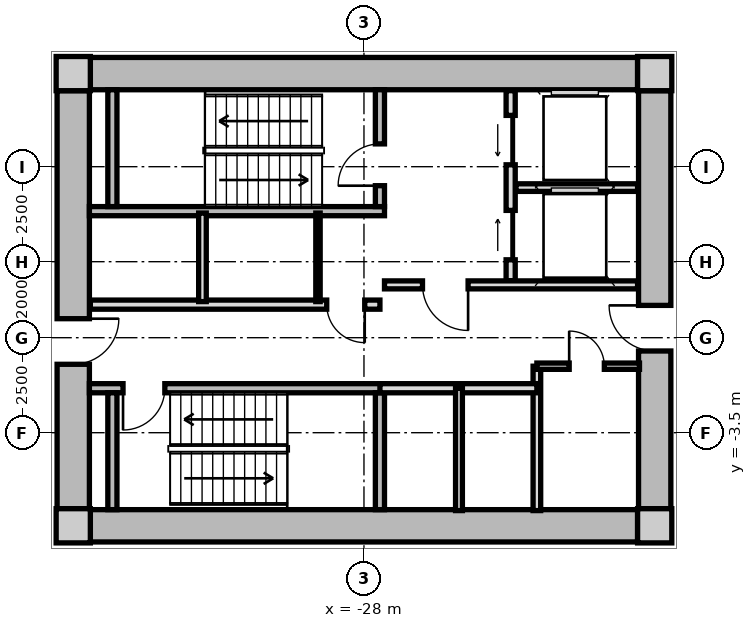
"""IFC4 building model, lengths in metres.
Left out: names, types, materials, properties, quantities, classifications, styles, units other than length and angle.
Written with IfcOpenShell. Run it as: python <this file> out.ifc"""

import sys

from ifc_helpers import new_model, si_unit, direction, frame, frame_2d, origin, origin_2d, place, context, subcontext, project, spatial, rectangle, extrude, source, transform, mapped, element, fill, save


model = new_model("IFC4")
c1 = context("Model", 3, precision=1e-05, world=origin(), true_north=direction((0.0, 1.0)))
c2 = subcontext(c1, "Body", "Model", "MODEL_VIEW")
j1 = project(units=[si_unit("LENGTHUNIT", "METRE"), si_unit("PLANEANGLEUNIT", "RADIAN")], contexts=[c1])
p1 = place(None, origin())
s1 = spatial("IfcSite", under=j1, at=p1, CompositionType="ELEMENT")
p2 = place(p1, origin())
s2 = spatial("IfcBuilding", under=s1, at=p2, CompositionType="ELEMENT")
p3 = place(p2, frame((0.0, 0.0, -8.4)))
s3 = spatial("IfcBuildingStorey", under=s2, at=p3, CompositionType="ELEMENT", Elevation=-8.4)
m1 = source(origin(), c2, "Body", "SweptSolid", [
    extrude(rectangle(XDim=0.9, YDim=0.9, at=origin_2d()), origin(), (0.0, 0.0, 1.0), 4.2),
])
for number, where, z_axis, x_axis in (
    (1, (-35.65, -5.95, 0.0), (0.0, 0.0, 1.0), (1.0, 0.0, 0.0)),
    (2, (-20.35, -5.95, 0.0), (0.0, 0.0, 1.0), (1.0, 0.0, 0.0)),
    (3, (-20.35, 5.95, 0.0), (0.0, 0.0, 1.0), (1.0, 0.0, 0.0)),
    (4, (-35.65, 5.95, 0.0), (0.0, 0.0, 1.0), (1.0, 0.0, 0.0)),
):
    element("IfcColumn", number, at=place(p3, frame(where, z_axis=z_axis, x_axis=x_axis)), inside=s3, PredefinedType="COLUMN", context=c2, shape_type="MappedRepresentation", body=[
        mapped(m1, transform((0.0, 0.0, 0.0), x_axis=(1.0, 0.0, 0.0), y_axis=(0.0, 1.0, 0.0), z_axis=(0.0, 0.0, 1.0), scale=1.0)),
    ])
m2 = source(origin(), c2, "Body", "SweptSolid", [
    extrude(rectangle(XDim=14.4, YDim=0.85, at=frame_2d((7.2, 0.0))), origin(), (0.0, 0.0, 1.0), 3.88),
])
for number, where, z_axis, x_axis in (
    (5, (-35.2, 5.95, 0.0), (0.0, 0.0, 1.0), (1.0, 0.0, 0.0)),
    (6, (-20.8, -5.95, 0.0), (0.0, 0.0, 1.0), (-1.0, 0.0, 0.0)),
):
    element("IfcWall", number, at=place(p3, frame(where, z_axis=z_axis, x_axis=x_axis)), inside=s3, PredefinedType="SHEAR", context=c2, shape_type="MappedRepresentation", body=[
        mapped(m2, transform((0.0, 0.0, 0.0), x_axis=(1.0, 0.0, 0.0), y_axis=(0.0, 1.0, 0.0), z_axis=(0.0, 0.0, 1.0), scale=1.0)),
    ])
m3 = source(origin(), c2, "Body", "SweptSolid", [
    extrude(rectangle(XDim=11.0, YDim=0.85, at=frame_2d((5.5, 0.0))), origin(), (0.0, 0.0, 1.0), 3.88),
])
p4 = place(p3, frame((-35.65, -5.5, 0.0), z_axis=(0.0, 0.0, 1.0), x_axis=(0.0, 1.0, 0.0)))
e7 = element("IfcWall", 7, at=p4, inside=s3, PredefinedType="SHEAR", context=c2, shape_type="MappedRepresentation", body=[
    mapped(m3, transform((0.0, 0.0, 0.0), x_axis=(1.0, 0.0, 0.0), y_axis=(0.0, 1.0, 0.0), z_axis=(0.0, 0.0, 1.0), scale=1.0)),
])
p5 = place(p4, frame((3.8, 0.0, 0.0)))
e8 = element("IfcOpeningElement", 8, at=p5, cuts=e7, PredefinedType="OPENING", context=c2, shape_type="SweptSolid", body=[
    extrude(rectangle(XDim=1.2, YDim=2.15, at=frame_2d((0.6, 1.075))), frame((0.0, 0.435, 0.0), z_axis=(0.0, -1.0, 0.0), x_axis=(1.0, 0.0, 0.0)), (0.0, 0.0, 1.0), 0.87),
])
p6 = place(p3, frame((-20.35, 5.5, 0.0), z_axis=(0.0, 0.0, 1.0), x_axis=(0.0, -1.0, 0.0)))
e9 = element("IfcWall", 9, at=p6, inside=s3, PredefinedType="SHEAR", context=c2, shape_type="MappedRepresentation", body=[
    mapped(m3, transform((0.0, 0.0, 0.0), x_axis=(1.0, 0.0, 0.0), y_axis=(0.0, 1.0, 0.0), z_axis=(0.0, 0.0, 1.0), scale=1.0)),
])
p7 = place(p6, frame((5.65, 0.0, 0.0)))
e10 = element("IfcOpeningElement", 10, at=p7, cuts=e9, PredefinedType="OPENING", context=c2, shape_type="SweptSolid", body=[
    extrude(rectangle(XDim=1.2, YDim=2.15, at=frame_2d((0.6, 1.075))), frame((0.0, 0.435, 0.0), z_axis=(0.0, -1.0, 0.0), x_axis=(1.0, 0.0, 0.0)), (0.0, 0.0, 1.0), 0.87),
])
m4 = source(origin(), c2, "Body", "SweptSolid", [
    extrude(rectangle(XDim=7.765, YDim=0.24, at=frame_2d((3.883, 0.0))), origin(), (0.0, 0.0, 1.0), 3.88),
])
p8 = place(p3, frame((-35.225, 2.33, 0.0), z_axis=(0.0, 0.0, 1.0), x_axis=(1.0, 0.0, 0.0)))
e11 = element("IfcWall", 11, at=p8, inside=s3, PredefinedType="PARTITIONING", context=c2, shape_type="MappedRepresentation", body=[
    mapped(m4, transform((0.0, 0.0, 0.0), x_axis=(1.0, 0.0, 0.0), y_axis=(0.0, 1.0, 0.0), z_axis=(0.0, 0.0, 1.0), scale=1.0)),
])
m5 = source(origin(), c2, "Body", "SweptSolid", [
    extrude(rectangle(XDim=3.075, YDim=0.24, at=frame_2d((1.538, 0.0))), origin(), (0.0, 0.0, 1.0), 3.88),
])
p9 = place(p3, frame((-34.62, 2.45, 0.0), z_axis=(0.0, 0.0, 1.0), x_axis=(0.0, 1.0, 0.0)))
e12 = element("IfcWall", 12, at=p9, inside=s3, PredefinedType="PARTITIONING", context=c2, shape_type="MappedRepresentation", body=[
    mapped(m5, transform((0.0, 0.0, 0.0), x_axis=(1.0, 0.0, 0.0), y_axis=(0.0, 1.0, 0.0), z_axis=(0.0, 0.0, 1.0), scale=1.0)),
])
p10 = place(p3, frame((-27.58, 2.45, 0.0), z_axis=(0.0, 0.0, 1.0), x_axis=(0.0, 1.0, 0.0)))
e13 = element("IfcWall", 13, at=p10, inside=s3, PredefinedType="PARTITIONING", context=c2, shape_type="MappedRepresentation", body=[
    mapped(m5, transform((0.0, 0.0, 0.0), x_axis=(1.0, 0.0, 0.0), y_axis=(0.0, 1.0, 0.0), z_axis=(0.0, 0.0, 1.0), scale=1.0)),
])
p11 = place(p10, frame((0.55, 0.0, 0.0)))
e14 = element("IfcOpeningElement", 14, at=p11, cuts=e13, PredefinedType="OPENING", context=c2, shape_type="SweptSolid", body=[
    extrude(rectangle(XDim=1.1, YDim=2.15, at=frame_2d((0.55, 1.075))), frame((0.0, 0.13, 0.0), z_axis=(0.0, -1.0, 0.0), x_axis=(1.0, 0.0, 0.0)), (0.0, 0.0, 1.0), 0.26),
])
p12 = place(p3, frame((-35.225, -2.33, 0.0), z_axis=(0.0, 0.0, 1.0), x_axis=(1.0, 0.0, 0.0)))
e15 = element("IfcWall", 15, at=p12, inside=s3, PredefinedType="PARTITIONING", context=c2, shape_type="MappedRepresentation", body=[
    mapped(m4, transform((0.0, 0.0, 0.0), x_axis=(1.0, 0.0, 0.0), y_axis=(0.0, 1.0, 0.0), z_axis=(0.0, 0.0, 1.0), scale=1.0)),
])
p13 = place(p12, frame((0.885, 0.0, 0.0)))
e16 = element("IfcOpeningElement", 16, at=p13, cuts=e15, PredefinedType="OPENING", context=c2, shape_type="SweptSolid", body=[
    extrude(rectangle(XDim=1.1, YDim=2.15, at=frame_2d((0.55, 1.075))), frame((0.0, 0.13, 0.0), z_axis=(0.0, -1.0, 0.0), x_axis=(1.0, 0.0, 0.0)), (0.0, 0.0, 1.0), 0.26),
])
for number, where, z_axis, x_axis in (
    (17, (-34.62, -5.525, 0.0), (0.0, 0.0, 1.0), (0.0, 1.0, 0.0)),
    (18, (-27.58, -5.525, 0.0), (0.0, 0.0, 1.0), (0.0, 1.0, 0.0)),
):
    element("IfcWall", number, at=place(p3, frame(where, z_axis=z_axis, x_axis=x_axis)), inside=s3, PredefinedType="PARTITIONING", context=c2, shape_type="MappedRepresentation", body=[
        mapped(m5, transform((0.0, 0.0, 0.0), x_axis=(1.0, 0.0, 0.0), y_axis=(0.0, 1.0, 0.0), z_axis=(0.0, 0.0, 1.0), scale=1.0)),
    ])
m6 = source(origin(), c2, "Body", "SweptSolid", [
    extrude(rectangle(XDim=5.0, YDim=0.24, at=frame_2d((2.5, 0.0))), origin(), (0.0, 0.0, 1.0), 3.865),
])
p14 = place(p3, frame((-24.14, 0.5, 0.0), z_axis=(0.0, 0.0, 1.0), x_axis=(0.0, 1.0, 0.0)))
e19 = element("IfcWall", 19, at=p14, inside=s3, PredefinedType="PARTITIONING", context=c2, shape_type="MappedRepresentation", body=[
    mapped(m6, transform((0.0, 0.0, 0.0), x_axis=(1.0, 0.0, 0.0), y_axis=(0.0, 1.0, 0.0), z_axis=(0.0, 0.0, 1.0), scale=1.0)),
])
p15 = place(p14, frame((3.05, 0.0, 0.0)))
e20 = element("IfcOpeningElement", 20, at=p15, cuts=e19, PredefinedType="OPENING", context=c2, shape_type="SweptSolid", body=[
    extrude(rectangle(XDim=1.3, YDim=2.2, at=frame_2d((0.65, 1.1))), frame((0.0, 0.13, 0.0), z_axis=(0.0, -1.0, 0.0), x_axis=(1.0, 0.0, 0.0)), (0.0, 0.0, 1.0), 0.26),
])
p16 = place(p14, frame((0.55, 0.0, 0.0)))
e21 = element("IfcOpeningElement", 21, at=p16, cuts=e19, PredefinedType="OPENING", context=c2, shape_type="SweptSolid", body=[
    extrude(rectangle(XDim=1.3, YDim=2.2, at=frame_2d((0.65, 1.1))), frame((0.0, 0.13, 0.0), z_axis=(0.0, -1.0, 0.0), x_axis=(1.0, 0.0, 0.0)), (0.0, 0.0, 1.0), 0.26),
])
m7 = source(origin(), c2, "Body", "SweptSolid", [
    extrude(rectangle(XDim=3.2, YDim=0.2, at=frame_2d((1.6, 0.0))), origin(), (0.0, 0.0, 1.0), 3.865),
])
p17 = place(p3, frame((-24.0, 2.95, 0.0), z_axis=(0.0, 0.0, 1.0), x_axis=(1.0, 0.0, 0.0)))
e22 = element("IfcWall", 22, at=p17, inside=s3, PredefinedType="PARTITIONING", context=c2, shape_type="MappedRepresentation", body=[
    mapped(m7, transform((0.0, 0.0, 0.0), x_axis=(1.0, 0.0, 0.0), y_axis=(0.0, 1.0, 0.0), z_axis=(0.0, 0.0, 1.0), scale=1.0)),
])
m8 = source(origin(), c2, "Body", "SweptSolid", [
    extrude(rectangle(XDim=6.66, YDim=0.21, at=frame_2d((3.33, 0.0))), origin(), (0.0, 0.0, 1.0), 3.865),
])
p18 = place(p3, frame((-27.46, 0.39, 0.0), z_axis=(0.0, 0.0, 1.0), x_axis=(1.0, 0.0, 0.0)))
e23 = element("IfcWall", 23, at=p18, inside=s3, PredefinedType="PARTITIONING", context=c2, shape_type="MappedRepresentation", body=[
    mapped(m8, transform((0.0, 0.0, 0.0), x_axis=(1.0, 0.0, 0.0), y_axis=(0.0, 1.0, 0.0), z_axis=(0.0, 0.0, 1.0), scale=1.0)),
])
p19 = place(p18, frame((1.0, 0.0, 0.0)))
e24 = element("IfcOpeningElement", 24, at=p19, cuts=e23, PredefinedType="OPENING", context=c2, shape_type="SweptSolid", body=[
    extrude(rectangle(XDim=1.2, YDim=2.15, at=frame_2d((0.6, 1.075))), frame((0.0, 0.115, 0.0), z_axis=(0.0, -1.0, 0.0), x_axis=(1.0, 0.0, 0.0)), (0.0, 0.0, 1.0), 0.23),
])
m9 = source(origin(), c2, "Body", "SweptSolid", [
    extrude(rectangle(XDim=7.62, YDim=0.24, at=frame_2d((3.81, 0.0))), origin(), (0.0, 0.0, 1.0), 3.865),
])
p20 = place(p3, frame((-35.2, -0.13, 0.0), z_axis=(0.0, 0.0, 1.0), x_axis=(1.0, 0.0, 0.0)))
e25 = element("IfcWall", 25, at=p20, inside=s3, PredefinedType="PARTITIONING", context=c2, shape_type="MappedRepresentation", body=[
    mapped(m9, transform((0.0, 0.0, 0.0), x_axis=(1.0, 0.0, 0.0), y_axis=(0.0, 1.0, 0.0), z_axis=(0.0, 0.0, 1.0), scale=1.0)),
])
p21 = place(p20, frame((6.22, 0.0, 0.0)))
e26 = element("IfcOpeningElement", 26, at=p21, cuts=e25, PredefinedType="OPENING", context=c2, shape_type="SweptSolid", body=[
    extrude(rectangle(XDim=1.0, YDim=2.1, at=frame_2d((0.5, 1.05))), frame((0.0, 0.13, 0.0), z_axis=(0.0, -1.0, 0.0), x_axis=(1.0, 0.0, 0.0)), (0.0, 0.0, 1.0), 0.26),
])
m10 = source(origin(), c2, "Body", "SweptSolid", [
    extrude(rectangle(XDim=2.33, YDim=0.115, at=frame_2d((1.165, 0.0))), origin(), (0.0, 0.0, 1.0), 3.865),
])
p22 = place(p3, frame((-29.21, -0.05, 0.0), z_axis=(0.0, 0.0, 1.0), x_axis=(0.0, 1.0, 0.0)))
e27 = element("IfcWall", 27, at=p22, inside=s3, PredefinedType="PARTITIONING", context=c2, shape_type="MappedRepresentation", body=[
    mapped(m10, transform((0.0, 0.0, 0.0), x_axis=(1.0, 0.0, 0.0), y_axis=(0.0, 1.0, 0.0), z_axis=(0.0, 0.0, 1.0), scale=1.0)),
])
m11 = source(origin(), c2, "Body", "SweptSolid", [
    extrude(rectangle(XDim=2.33, YDim=0.2, at=frame_2d((1.165, 0.0))), origin(), (0.0, 0.0, 1.0), 3.865),
])
p23 = place(p3, frame((-32.25, -0.05, 0.0), z_axis=(0.0, 0.0, 1.0), x_axis=(0.0, 1.0, 0.0)))
e28 = element("IfcWall", 28, at=p23, inside=s3, PredefinedType="PARTITIONING", context=c2, shape_type="MappedRepresentation", body=[
    mapped(m11, transform((0.0, 0.0, 0.0), x_axis=(1.0, 0.0, 0.0), y_axis=(0.0, 1.0, 0.0), z_axis=(0.0, 0.0, 1.0), scale=1.0)),
])
m12 = source(origin(), c2, "Body", "SweptSolid", [
    extrude(rectangle(XDim=3.8, YDim=0.2, at=frame_2d((1.9, 0.0))), origin(), (0.0, 0.0, 1.0), 3.865),
])
p24 = place(p3, frame((-23.45, -5.55, 0.0), z_axis=(0.0, 0.0, 1.0), x_axis=(0.0, 1.0, 0.0)))
e29 = element("IfcWall", 29, at=p24, inside=s3, PredefinedType="PARTITIONING", context=c2, shape_type="MappedRepresentation", body=[
    mapped(m12, transform((0.0, 0.0, 0.0), x_axis=(1.0, 0.0, 0.0), y_axis=(0.0, 1.0, 0.0), z_axis=(0.0, 0.0, 1.0), scale=1.0)),
])
m13 = source(origin(), c2, "Body", "SweptSolid", [
    extrude(rectangle(XDim=4.13, YDim=0.24, at=frame_2d((2.065, 0.0))), origin(), (0.0, 0.0, 1.0), 3.865),
])
p25 = place(p3, frame((-27.58, -2.33, 0.0), z_axis=(0.0, 0.0, 1.0), x_axis=(1.0, 0.0, 0.0)))
e30 = element("IfcWall", 30, at=p25, inside=s3, PredefinedType="PARTITIONING", context=c2, shape_type="MappedRepresentation", body=[
    mapped(m13, transform((0.0, 0.0, 0.0), x_axis=(1.0, 0.0, 0.0), y_axis=(0.0, 1.0, 0.0), z_axis=(0.0, 0.0, 1.0), scale=1.0)),
])
m14 = source(origin(), c2, "Body", "SweptSolid", [
    extrude(rectangle(XDim=3.22, YDim=0.18, at=frame_2d((1.61, 0.0))), origin(), (0.0, 0.0, 1.0), 3.865),
])
p26 = place(p3, frame((-25.5, -5.55, 0.0), z_axis=(0.0, 0.0, 1.0), x_axis=(0.0, 1.0, 0.0)))
e31 = element("IfcWall", 31, at=p26, inside=s3, PredefinedType="PARTITIONING", context=c2, shape_type="MappedRepresentation", body=[
    mapped(m14, transform((0.0, 0.0, 0.0), x_axis=(1.0, 0.0, 0.0), y_axis=(0.0, 1.0, 0.0), z_axis=(0.0, 0.0, 1.0), scale=1.0)),
])
m15 = source(origin(), c2, "Body", "SweptSolid", [
    extrude(rectangle(XDim=2.7, YDim=0.165, at=frame_2d((1.35, 0.0))), origin(), (0.0, 0.0, 1.0), 3.865),
])
p27 = place(p3, frame((-23.45, -1.75, 0.0), z_axis=(0.0, 0.0, 1.0), x_axis=(1.0, 0.0, 0.0)))
e32 = element("IfcWall", 32, at=p27, inside=s3, PredefinedType="PARTITIONING", context=c2, shape_type="MappedRepresentation", body=[
    mapped(m15, transform((0.0, 0.0, 0.0), x_axis=(1.0, 0.0, 0.0), y_axis=(0.0, 1.0, 0.0), z_axis=(0.0, 0.0, 1.0), scale=1.0)),
])
p28 = place(p27, frame((0.85, 0.0, 0.0)))
e33 = element("IfcOpeningElement", 33, at=p28, cuts=e32, PredefinedType="OPENING", context=c2, shape_type="SweptSolid", body=[
    extrude(rectangle(XDim=0.925, YDim=2.1, at=frame_2d((0.462, 1.05))), frame((0.0, 0.093, 0.0), z_axis=(0.0, -1.0, 0.0), x_axis=(1.0, 0.0, 0.0)), (0.0, 0.0, 1.0), 0.185),
])
m16 = source(origin(), c2, "Body", "SweptSolid", [
    extrude(rectangle(XDim=1.1, YDim=2.15, at=frame_2d((0.55, 1.075))), frame((0.0, 0.025, 0.0), z_axis=(0.0, -1.0, 0.0), x_axis=(1.0, 0.0, 0.0)), (0.0, 0.0, 1.0), 0.05),
])
p29 = place(p11, origin())
e34 = element("IfcDoor", 34, at=p29, inside=s3, OperationType="SINGLE_SWING_LEFT", PredefinedType="DOOR", context=c2, shape_type="MappedRepresentation", body=[
    mapped(m16, transform((0.0, 0.0, 0.0), x_axis=(1.0, 0.0, 0.0), y_axis=(0.0, 1.0, 0.0), z_axis=(0.0, 0.0, 1.0), scale=1.0)),
])
fill(e14, e34)
p30 = place(p13, frame((1.1, 0.0, 0.0), z_axis=(0.0, 0.0, 1.0), x_axis=(-1.0, 0.0, 0.0)))
e35 = element("IfcDoor", 35, at=p30, inside=s3, OperationType="SINGLE_SWING_RIGHT", PredefinedType="DOOR", context=c2, shape_type="MappedRepresentation", body=[
    mapped(m16, transform((0.0, 0.0, 0.0), x_axis=(1.0, 0.0, 0.0), y_axis=(0.0, 1.0, 0.0), z_axis=(0.0, 0.0, 1.0), scale=1.0)),
])
fill(e16, e35)
m17 = source(origin(), c2, "Body", "SweptSolid", [
    extrude(rectangle(XDim=1.3, YDim=2.2, at=frame_2d((0.65, 1.1))), frame((0.0, 0.025, 0.0), z_axis=(0.0, -1.0, 0.0), x_axis=(1.0, 0.0, 0.0)), (0.0, 0.0, 1.0), 0.05),
])
p31 = place(p15, origin())
e36 = element("IfcDoor", 36, at=p31, inside=s3, OperationType="SLIDING_TO_LEFT", PredefinedType="DOOR", context=c2, shape_type="MappedRepresentation", body=[
    mapped(m17, transform((0.0, 0.0, 0.0), x_axis=(1.0, 0.0, 0.0), y_axis=(0.0, 1.0, 0.0), z_axis=(0.0, 0.0, 1.0), scale=1.0)),
])
fill(e20, e36)
p32 = place(p16, origin())
e37 = element("IfcDoor", 37, at=p32, inside=s3, OperationType="SLIDING_TO_RIGHT", PredefinedType="DOOR", context=c2, shape_type="MappedRepresentation", body=[
    mapped(m17, transform((0.0, 0.0, 0.0), x_axis=(1.0, 0.0, 0.0), y_axis=(0.0, 1.0, 0.0), z_axis=(0.0, 0.0, 1.0), scale=1.0)),
])
fill(e21, e37)
m18 = source(origin(), c2, "Body", "SweptSolid", [
    extrude(rectangle(XDim=1.2, YDim=2.15, at=frame_2d((0.6, 1.075))), frame((0.0, 0.025, 0.0), z_axis=(0.0, -1.0, 0.0), x_axis=(1.0, 0.0, 0.0)), (0.0, 0.0, 1.0), 0.05),
])
p33 = place(p19, frame((1.2, 0.0, 0.0), z_axis=(0.0, 0.0, 1.0), x_axis=(-1.0, 0.0, 0.0)))
e38 = element("IfcDoor", 38, at=p33, inside=s3, OperationType="SINGLE_SWING_LEFT", PredefinedType="DOOR", context=c2, shape_type="MappedRepresentation", body=[
    mapped(m18, transform((0.0, 0.0, 0.0), x_axis=(1.0, 0.0, 0.0), y_axis=(0.0, 1.0, 0.0), z_axis=(0.0, 0.0, 1.0), scale=1.0)),
])
fill(e24, e38)
p34 = place(p5, frame((1.2, 0.0, 0.0), z_axis=(0.0, 0.0, 1.0), x_axis=(-1.0, 0.0, 0.0)))
e39 = element("IfcDoor", 39, at=p34, inside=s3, OperationType="SINGLE_SWING_LEFT", PredefinedType="DOOR", context=c2, shape_type="MappedRepresentation", body=[
    mapped(m18, transform((0.0, 0.0, 0.0), x_axis=(1.0, 0.0, 0.0), y_axis=(0.0, 1.0, 0.0), z_axis=(0.0, 0.0, 1.0), scale=1.0)),
])
fill(e8, e39)
p35 = place(p7, frame((1.2, 0.0, 0.0), z_axis=(0.0, 0.0, 1.0), x_axis=(-1.0, 0.0, 0.0)))
e40 = element("IfcDoor", 40, at=p35, inside=s3, OperationType="SINGLE_SWING_RIGHT", PredefinedType="DOOR", context=c2, shape_type="MappedRepresentation", body=[
    mapped(m18, transform((0.0, 0.0, 0.0), x_axis=(1.0, 0.0, 0.0), y_axis=(0.0, 1.0, 0.0), z_axis=(0.0, 0.0, 1.0), scale=1.0)),
])
fill(e10, e40)
m19 = source(origin(), c2, "Body", "SweptSolid", [
    extrude(rectangle(XDim=1.0, YDim=2.1, at=frame_2d((0.5, 1.05))), frame((0.0, 0.025, 0.0), z_axis=(0.0, -1.0, 0.0), x_axis=(1.0, 0.0, 0.0)), (0.0, 0.0, 1.0), 0.05),
])
p36 = place(p21, frame((1.0, 0.0, 0.0), z_axis=(0.0, 0.0, 1.0), x_axis=(-1.0, 0.0, 0.0)))
e41 = element("IfcDoor", 41, at=p36, inside=s3, OperationType="SINGLE_SWING_LEFT", PredefinedType="DOOR", context=c2, shape_type="MappedRepresentation", body=[
    mapped(m19, transform((0.0, 0.0, 0.0), x_axis=(1.0, 0.0, 0.0), y_axis=(0.0, 1.0, 0.0), z_axis=(0.0, 0.0, 1.0), scale=1.0)),
])
fill(e26, e41)
m20 = source(origin(), c2, "Body", "SweptSolid", [
    extrude(rectangle(XDim=0.925, YDim=2.1, at=frame_2d((0.462, 1.05))), frame((0.0, 0.025, 0.0), z_axis=(0.0, -1.0, 0.0), x_axis=(1.0, 0.0, 0.0)), (0.0, 0.0, 1.0), 0.05),
])
p37 = place(p28, origin())
e42 = element("IfcDoor", 42, at=p37, inside=s3, OperationType="SINGLE_SWING_LEFT", PredefinedType="DOOR", context=c2, shape_type="MappedRepresentation", body=[
    mapped(m20, transform((0.0, 0.0, 0.0), x_axis=(1.0, 0.0, 0.0), y_axis=(0.0, 1.0, 0.0), z_axis=(0.0, 0.0, 1.0), scale=1.0)),
])
fill(e33, e42)
save(model, sys.argv[1])
